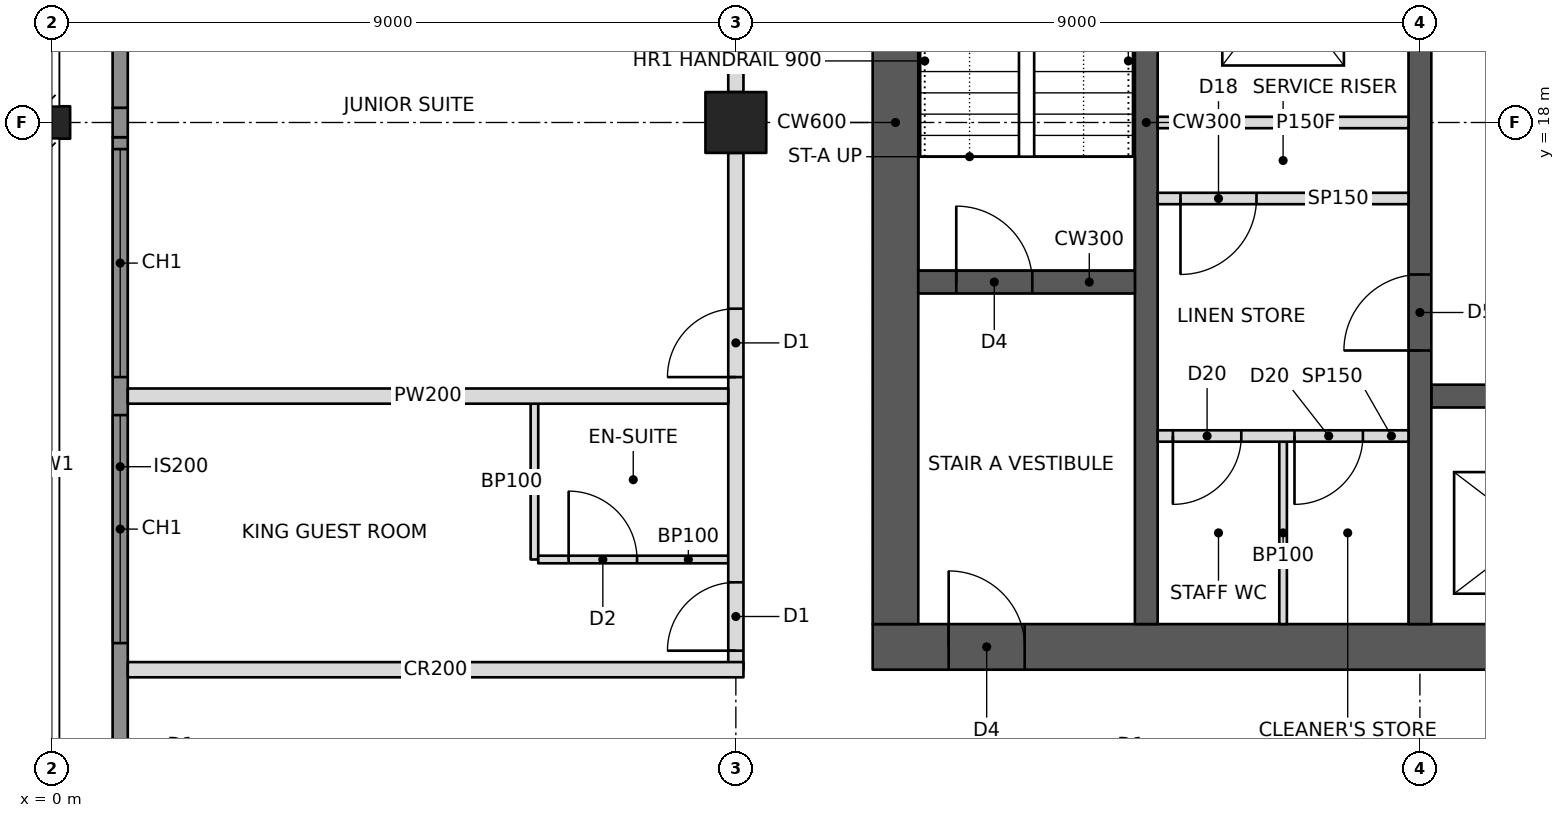
"""IFC4 building model, lengths in metres.
Left out: names, types, materials, properties, quantities, classifications, styles, units other than length and angle.
Written with IfcOpenShell. Run it as: python <this file> out.ifc"""

import sys

from ifc_helpers import new_model, si_unit, direction, frame, frame_2d, origin, origin_2d, place, context, subcontext, project, spatial, rectangle, hollow_rectangle, i_section, extrude, element, fill, save


model = new_model("IFC4")
c1 = context("Model", 3, precision=1e-05, world=origin(), true_north=direction((0.0, 1.0)))
c2 = subcontext(c1, "Body", "Model", "MODEL_VIEW")
j1 = project(units=[si_unit("LENGTHUNIT", "METRE"), si_unit("PLANEANGLEUNIT", "RADIAN")], contexts=[c1])
p1 = place(None, origin())
s1 = spatial("IfcSite", under=j1, at=p1, CompositionType="ELEMENT")
p2 = place(p1, origin())
s2 = spatial("IfcBuilding", under=s1, at=p2, CompositionType="ELEMENT")
p3 = place(p2, frame((0.0, 0.0, 208.0)))
s3 = spatial("IfcBuildingStorey", under=s2, at=p3, CompositionType="ELEMENT", Elevation=208.0)
p4 = place(p3, frame((0.0, 18.0, 0.0), z_axis=(0.0, 0.0, 1.0), x_axis=(0.0, 1.0, 0.0)))
e1 = element("IfcColumn", 1, at=p4, inside=s3, PredefinedType="COLUMN", context=c2, shape_type="SweptSolid", body=[
    extrude(i_section(OverallWidth=0.427, OverallDepth=0.483, WebThickness=0.051, FlangeThickness=0.082, at=origin_2d()), origin(), (0.0, 0.0, 1.0), 3.4),
])
p5 = place(p3, frame((9.0, 18.0, 0.0), z_axis=(0.0, 0.0, 1.0), x_axis=(1.0, 0.0, 0.0)))
e2 = element("IfcColumn", 2, at=p5, inside=s3, PredefinedType="COLUMN", context=c2, shape_type="SweptSolid", body=[
    extrude(hollow_rectangle(XDim=0.8, YDim=0.8, WallThickness=0.05, at=origin_2d()), origin(), (0.0, 0.0, 1.0), 3.4),
])
p6 = place(p3, frame((10.8, 11.1, 0.0), z_axis=(0.0, 0.0, 1.0), x_axis=(1.0, 0.0, 0.0)))
e3 = element("IfcWall", 3, at=p6, inside=s3, PredefinedType="SHEAR", context=c2, shape_type="SweptSolid", body=[
    extrude(rectangle(XDim=23.4, YDim=0.6, at=frame_2d((11.7, 0.0))), origin(), (0.0, 0.0, 1.0), 3.4),
])
p7 = place(p6, frame((1.0, 0.0, 0.0)))
e4 = element("IfcOpeningElement", 4, at=p7, cuts=e3, PredefinedType="OPENING", context=c2, shape_type="SweptSolid", body=[
    extrude(rectangle(XDim=1.0, YDim=2.1, at=frame_2d((0.5, 1.05))), frame((0.0, 0.31, 0.0), z_axis=(0.0, -1.0, 0.0), x_axis=(1.0, 0.0, 0.0)), (0.0, 0.0, 1.0), 0.62),
])
p8 = place(p6, frame((17.2, 0.0, 0.0)))
e5 = element("IfcOpeningElement", 5, at=p8, cuts=e3, PredefinedType="OPENING", context=c2, shape_type="SweptSolid", body=[
    extrude(rectangle(XDim=1.8, YDim=2.1, at=frame_2d((0.9, 1.05))), frame((0.0, 0.31, 0.0), z_axis=(0.0, -1.0, 0.0), x_axis=(1.0, 0.0, 0.0)), (0.0, 0.0, 1.0), 0.62),
])
p9 = place(p3, frame((11.1, 11.4, 0.0), z_axis=(0.0, 0.0, 1.0), x_axis=(0.0, 1.0, 0.0)))
e6 = element("IfcWall", 6, at=p9, inside=s3, PredefinedType="SHEAR", context=c2, shape_type="SweptSolid", body=[
    extrude(rectangle(XDim=13.2, YDim=0.6, at=frame_2d((6.6, 0.0))), origin(), (0.0, 0.0, 1.0), 3.4),
])
p10 = place(p3, frame((14.4, 11.4, 0.0), z_axis=(0.0, 0.0, 1.0), x_axis=(0.0, 1.0, 0.0)))
e7 = element("IfcWall", 7, at=p10, inside=s3, PredefinedType="SHEAR", context=c2, shape_type="SweptSolid", body=[
    extrude(rectangle(XDim=13.2, YDim=0.3, at=frame_2d((6.6, 0.0))), origin(), (0.0, 0.0, 1.0), 3.4),
])
p11 = place(p3, frame((11.4, 15.9, 0.0), z_axis=(0.0, 0.0, 1.0), x_axis=(1.0, 0.0, 0.0)))
e8 = element("IfcWall", 8, at=p11, inside=s3, PredefinedType="SHEAR", context=c2, shape_type="SweptSolid", body=[
    extrude(rectangle(XDim=2.85, YDim=0.3, at=frame_2d((1.425, 0.0))), origin(), (0.0, 0.0, 1.0), 3.4),
])
p12 = place(p11, frame((0.5, 0.0, 0.0)))
e9 = element("IfcOpeningElement", 9, at=p12, cuts=e8, PredefinedType="OPENING", context=c2, shape_type="SweptSolid", body=[
    extrude(rectangle(XDim=1.0, YDim=2.1, at=frame_2d((0.5, 1.05))), frame((0.0, 0.16, 0.0), z_axis=(0.0, -1.0, 0.0), x_axis=(1.0, 0.0, 0.0)), (0.0, 0.0, 1.0), 0.32),
])
p13 = place(p3, frame((18.0, 11.4, 0.0), z_axis=(0.0, 0.0, 1.0), x_axis=(0.0, 1.0, 0.0)))
e10 = element("IfcWall", 10, at=p13, inside=s3, PredefinedType="SHEAR", context=c2, shape_type="SweptSolid", body=[
    extrude(rectangle(XDim=13.2, YDim=0.3, at=frame_2d((6.6, 0.0))), origin(), (0.0, 0.0, 1.0), 3.4),
])
p14 = place(p13, frame((3.6, 0.0, 0.0)))
e11 = element("IfcOpeningElement", 11, at=p14, cuts=e10, PredefinedType="OPENING", context=c2, shape_type="SweptSolid", body=[
    extrude(rectangle(XDim=1.0, YDim=2.1, at=frame_2d((0.5, 1.05))), frame((0.0, 0.16, 0.0), z_axis=(0.0, -1.0, 0.0), x_axis=(1.0, 0.0, 0.0)), (0.0, 0.0, 1.0), 0.32),
])
p15 = place(p13, frame((7.85, 0.0, 0.0)))
e12 = element("IfcOpeningElement", 12, at=p15, cuts=e10, PredefinedType="OPENING", context=c2, shape_type="SweptSolid", body=[
    extrude(rectangle(XDim=1.1, YDim=2.1, at=frame_2d((0.55, 1.05))), frame((0.0, 0.16, 0.0), z_axis=(0.0, -1.0, 0.0), x_axis=(1.0, 0.0, 0.0)), (0.0, 0.0, 1.0), 0.32),
])
p16 = place(p3, frame((14.55, 18.0, 0.0), z_axis=(0.0, 0.0, 1.0), x_axis=(1.0, 0.0, 0.0)))
e13 = element("IfcWall", 13, at=p16, inside=s3, PredefinedType="PARTITIONING", context=c2, shape_type="SweptSolid", body=[
    extrude(rectangle(XDim=3.3, YDim=0.15, at=frame_2d((1.65, 0.0))), origin(), (0.0, 0.0, 1.0), 3.2),
])
p17 = place(p3, frame((18.15, 14.4, 0.0), z_axis=(0.0, 0.0, 1.0), x_axis=(1.0, 0.0, 0.0)))
e14 = element("IfcWall", 14, at=p17, inside=s3, PredefinedType="SHEAR", context=c2, shape_type="SweptSolid", body=[
    extrude(rectangle(XDim=9.0, YDim=0.3, at=frame_2d((4.5, 0.0))), origin(), (0.0, 0.0, 1.0), 3.4),
])
p18 = place(p17, frame((0.8, 0.0, 0.0)))
e15 = element("IfcOpeningElement", 15, at=p18, cuts=e14, PredefinedType="OPENING", context=c2, shape_type="SweptSolid", body=[
    extrude(rectangle(XDim=1.1, YDim=2.1, at=frame_2d((0.55, 1.05))), frame((0.0, 0.16, 0.0), z_axis=(0.0, -1.0, 0.0), x_axis=(1.0, 0.0, 0.0)), (0.0, 0.0, 1.0), 0.32),
])
p19 = place(p17, frame((6.75, 0.0, 0.0)))
e16 = element("IfcOpeningElement", 16, at=p19, cuts=e14, PredefinedType="OPENING", context=c2, shape_type="SweptSolid", body=[
    extrude(rectangle(XDim=1.2, YDim=2.1, at=frame_2d((0.6, 1.05))), frame((0.0, 0.16, 0.0), z_axis=(0.0, -1.0, 0.0), x_axis=(1.0, 0.0, 0.0)), (0.0, 0.0, 1.0), 0.32),
])
p20 = place(p17, frame((3.8, 0.0, 0.0)))
e17 = element("IfcOpeningElement", 17, at=p20, cuts=e14, PredefinedType="OPENING", context=c2, shape_type="SweptSolid", body=[
    extrude(rectangle(XDim=1.1, YDim=2.1, at=frame_2d((0.55, 1.05))), frame((0.0, 0.16, 0.0), z_axis=(0.0, -1.0, 0.0), x_axis=(1.0, 0.0, 0.0)), (0.0, 0.0, 1.0), 0.32),
])
p21 = place(p3, frame((9.0, 10.8, 0.0), z_axis=(0.0, 0.0, 1.0), x_axis=(0.0, 1.0, 0.0)))
e18 = element("IfcWall", 18, at=p21, inside=s3, PredefinedType="PARTITIONING", context=c2, shape_type="SweptSolid", body=[
    extrude(rectangle(XDim=6.8, YDim=0.2, at=frame_2d((3.4, 0.0))), origin(), (0.0, 0.0, 1.0), 2.405),
])
p22 = place(p21, frame((0.25, 0.0, 0.0)))
e19 = element("IfcOpeningElement", 19, at=p22, cuts=e18, PredefinedType="OPENING", context=c2, shape_type="SweptSolid", body=[
    extrude(rectangle(XDim=0.9, YDim=2.1, at=frame_2d((0.45, 1.05))), frame((0.0, 0.11, 0.0), z_axis=(0.0, -1.0, 0.0), x_axis=(1.0, 0.0, 0.0)), (0.0, 0.0, 1.0), 0.22),
])
p23 = place(p21, frame((3.85, 0.0, 0.0)))
e20 = element("IfcOpeningElement", 20, at=p23, cuts=e18, PredefinedType="OPENING", context=c2, shape_type="SweptSolid", body=[
    extrude(rectangle(XDim=0.9, YDim=2.1, at=frame_2d((0.45, 1.05))), frame((0.0, 0.11, 0.0), z_axis=(0.0, -1.0, 0.0), x_axis=(1.0, 0.0, 0.0)), (0.0, 0.0, 1.0), 0.22),
])
p24 = place(p3, frame((9.0, 18.4, 0.0), z_axis=(0.0, 0.0, 1.0), x_axis=(0.0, 1.0, 0.0)))
e21 = element("IfcWall", 21, at=p24, inside=s3, PredefinedType="PARTITIONING", context=c2, shape_type="SweptSolid", body=[
    extrude(rectangle(XDim=8.2, YDim=0.2, at=frame_2d((4.1, 0.0))), origin(), (0.0, 0.0, 1.0), 2.405),
])
p25 = place(p3, frame((1.0, 10.8, 0.0), z_axis=(0.0, 0.0, 1.0), x_axis=(1.0, 0.0, 0.0)))
e22 = element("IfcWall", 22, at=p25, inside=s3, PredefinedType="PARTITIONING", context=c2, shape_type="SweptSolid", body=[
    extrude(rectangle(XDim=8.1, YDim=0.2, at=frame_2d((4.05, 0.0))), origin(), (0.0, 0.0, 1.0), 2.404),
])
p26 = place(p3, frame((8.9, 14.4, 0.0), z_axis=(0.0, 0.0, 1.0), x_axis=(-1.0, 0.0, 0.0)))
e23 = element("IfcWall", 23, at=p26, inside=s3, PredefinedType="PARTITIONING", context=c2, shape_type="SweptSolid", body=[
    extrude(rectangle(XDim=7.9, YDim=0.2, at=frame_2d((3.95, 0.0))), origin(), (0.0, 0.0, 1.0), 2.404),
])
p27 = place(p3, frame((6.35, 12.25, 0.0), z_axis=(0.0, 0.0, 1.0), x_axis=(0.0, 1.0, 0.0)))
e24 = element("IfcWall", 24, at=p27, inside=s3, PredefinedType="PARTITIONING", context=c2, shape_type="SweptSolid", body=[
    extrude(rectangle(XDim=2.05, YDim=0.1, at=frame_2d((1.025, 0.0))), origin(), (0.0, 0.0, 1.0), 3.2),
])
p28 = place(p3, frame((8.9, 12.25, 0.0), z_axis=(0.0, 0.0, 1.0), x_axis=(-1.0, 0.0, 0.0)))
e25 = element("IfcWall", 25, at=p28, inside=s3, PredefinedType="PARTITIONING", context=c2, shape_type="SweptSolid", body=[
    extrude(rectangle(XDim=2.5, YDim=0.1, at=frame_2d((1.25, 0.0))), origin(), (0.0, 0.0, 1.0), 2.404),
])
p29 = place(p28, frame((1.2, 0.0, 0.0)))
e26 = element("IfcOpeningElement", 26, at=p29, cuts=e25, PredefinedType="OPENING", context=c2, shape_type="SweptSolid", body=[
    extrude(rectangle(XDim=0.9, YDim=2.1, at=frame_2d((0.45, 1.05))), frame((0.0, 0.06, 0.0), z_axis=(0.0, -1.0, 0.0), x_axis=(1.0, 0.0, 0.0)), (0.0, 0.0, 1.0), 0.12),
])
p30 = place(p3, frame((14.55, 17.0, 0.0), z_axis=(0.0, 0.0, 1.0), x_axis=(1.0, 0.0, 0.0)))
e27 = element("IfcWall", 27, at=p30, inside=s3, PredefinedType="PARTITIONING", context=c2, shape_type="SweptSolid", body=[
    extrude(rectangle(XDim=3.3, YDim=0.15, at=frame_2d((1.65, 0.0))), origin(), (0.0, 0.0, 1.0), 3.2),
])
p31 = place(p30, frame((0.3, 0.0, 0.0)))
e28 = element("IfcOpeningElement", 28, at=p31, cuts=e27, PredefinedType="OPENING", context=c2, shape_type="SweptSolid", body=[
    extrude(rectangle(XDim=1.0, YDim=2.1, at=frame_2d((0.5, 1.05))), frame((0.0, 0.085, 0.0), z_axis=(0.0, -1.0, 0.0), x_axis=(1.0, 0.0, 0.0)), (0.0, 0.0, 1.0), 0.17),
])
p32 = place(p3, frame((14.55, 13.875, 0.0), z_axis=(0.0, 0.0, 1.0), x_axis=(1.0, 0.0, 0.0)))
e29 = element("IfcWall", 29, at=p32, inside=s3, PredefinedType="PARTITIONING", context=c2, shape_type="SweptSolid", body=[
    extrude(rectangle(XDim=3.3, YDim=0.15, at=frame_2d((1.65, 0.0))), origin(), (0.0, 0.0, 1.0), 3.2),
])
p33 = place(p32, frame((0.2, 0.0, 0.0)))
e30 = element("IfcOpeningElement", 30, at=p33, cuts=e29, PredefinedType="OPENING", context=c2, shape_type="SweptSolid", body=[
    extrude(rectangle(XDim=0.9, YDim=2.1, at=frame_2d((0.45, 1.05))), frame((0.0, 0.085, 0.0), z_axis=(0.0, -1.0, 0.0), x_axis=(1.0, 0.0, 0.0)), (0.0, 0.0, 1.0), 0.17),
])
p34 = place(p32, frame((1.8, 0.0, 0.0)))
e31 = element("IfcOpeningElement", 31, at=p34, cuts=e29, PredefinedType="OPENING", context=c2, shape_type="SweptSolid", body=[
    extrude(rectangle(XDim=0.9, YDim=2.1, at=frame_2d((0.45, 1.05))), frame((0.0, 0.085, 0.0), z_axis=(0.0, -1.0, 0.0), x_axis=(1.0, 0.0, 0.0)), (0.0, 0.0, 1.0), 0.17),
])
p35 = place(p3, frame((16.2, 11.4, 0.0), z_axis=(0.0, 0.0, 1.0), x_axis=(0.0, 1.0, 0.0)))
e32 = element("IfcWall", 32, at=p35, inside=s3, PredefinedType="PARTITIONING", context=c2, shape_type="SweptSolid", body=[
    extrude(rectangle(XDim=2.4, YDim=0.1, at=frame_2d((1.2, 0.0))), origin(), (0.0, 0.0, 1.0), 3.2),
])
p36 = place(p3, frame((0.9, 9.135, 0.0), z_axis=(0.0, 0.0, 1.0), x_axis=(0.0, 1.0, 0.0)))
e33 = element("IfcWall", 33, at=p36, inside=s3, PredefinedType="SOLIDWALL", context=c2, shape_type="SweptSolid", body=[
    extrude(rectangle(XDim=8.671, YDim=0.2, at=frame_2d((4.335, 0.0))), origin(), (0.0, 0.0, 1.0), 3.2),
])
p37 = place(p36, frame((2.015, 0.0, 0.6)))
e34 = element("IfcOpeningElement", 34, at=p37, cuts=e33, PredefinedType="OPENING", context=c2, shape_type="SweptSolid", body=[
    extrude(rectangle(XDim=3.0, YDim=2.2, at=frame_2d((1.5, 1.1))), frame((0.0, 0.11, 0.0), z_axis=(0.0, -1.0, 0.0), x_axis=(1.0, 0.0, 0.0)), (0.0, 0.0, 1.0), 0.22),
])
p38 = place(p36, frame((5.515, 0.0, 0.6)))
e35 = element("IfcOpeningElement", 35, at=p38, cuts=e33, PredefinedType="OPENING", context=c2, shape_type="SweptSolid", body=[
    extrude(rectangle(XDim=3.0, YDim=2.2, at=frame_2d((1.5, 1.1))), frame((0.0, 0.11, 0.0), z_axis=(0.0, -1.0, 0.0), x_axis=(1.0, 0.0, 0.0)), (0.0, 0.0, 1.0), 0.22),
])
p39 = place(p3, frame((0.9, 17.806, 0.0), z_axis=(0.0, 0.0, 1.0), x_axis=(0.0, 1.0, 0.0)))
e36 = element("IfcWall", 36, at=p39, inside=s3, PredefinedType="SOLIDWALL", context=c2, shape_type="SweptSolid", body=[
    extrude(rectangle(XDim=0.388, YDim=0.2, at=frame_2d((0.194, 0.0))), origin(), (0.0, 0.0, 1.0), 2.404),
])
p40 = place(p3, frame((0.9, 18.194, 0.0), z_axis=(0.0, 0.0, 1.0), x_axis=(0.0, 1.0, 0.0)))
e37 = element("IfcWall", 37, at=p40, inside=s3, PredefinedType="SOLIDWALL", context=c2, shape_type="SweptSolid", body=[
    extrude(rectangle(XDim=5.806, YDim=0.2, at=frame_2d((2.903, 0.0))), origin(), (0.0, 0.0, 1.0), 3.2),
])
p41 = place(p40, frame((1.356, 0.0, 0.6)))
e38 = element("IfcOpeningElement", 38, at=p41, cuts=e37, PredefinedType="OPENING", context=c2, shape_type="SweptSolid", body=[
    extrude(rectangle(XDim=3.0, YDim=2.2, at=frame_2d((1.5, 1.1))), frame((0.0, 0.11, 0.0), z_axis=(0.0, -1.0, 0.0), x_axis=(1.0, 0.0, 0.0)), (0.0, 0.0, 1.0), 0.22),
])
p42 = place(p37, origin())
e39 = element("IfcWindow", 39, at=p42, inside=s3, PartitioningType="TRIPLE_PANEL_VERTICAL", PredefinedType="WINDOW", context=c2, shape_type="SweptSolid", body=[
    extrude(rectangle(XDim=3.0, YDim=2.2, at=frame_2d((1.5, 1.1))), frame((0.0, 0.03, 0.0), z_axis=(0.0, -1.0, 0.0), x_axis=(1.0, 0.0, 0.0)), (0.0, 0.0, 1.0), 0.06),
])
fill(e34, e39)
p43 = place(p38, origin())
e40 = element("IfcWindow", 40, at=p43, inside=s3, PartitioningType="TRIPLE_PANEL_VERTICAL", PredefinedType="WINDOW", context=c2, shape_type="SweptSolid", body=[
    extrude(rectangle(XDim=3.0, YDim=2.2, at=frame_2d((1.5, 1.1))), frame((0.0, 0.03, 0.0), z_axis=(0.0, -1.0, 0.0), x_axis=(1.0, 0.0, 0.0)), (0.0, 0.0, 1.0), 0.06),
])
fill(e35, e40)
p44 = place(p29, frame((0.9, 0.0, 0.0), z_axis=(0.0, 0.0, 1.0), x_axis=(-1.0, 0.0, 0.0)))
e41 = element("IfcDoor", 41, at=p44, inside=s3, OperationType="SINGLE_SWING_LEFT", PredefinedType="DOOR", context=c2, shape_type="SweptSolid", body=[
    extrude(rectangle(XDim=0.9, YDim=2.1, at=frame_2d((0.45, 1.05))), frame((0.0, 0.025, 0.0), z_axis=(0.0, -1.0, 0.0), x_axis=(1.0, 0.0, 0.0)), (0.0, 0.0, 1.0), 0.05),
])
fill(e26, e41)
p45 = place(p22, origin())
e42 = element("IfcDoor", 42, at=p45, inside=s3, OperationType="SINGLE_SWING_LEFT", PredefinedType="DOOR", context=c2, shape_type="SweptSolid", body=[
    extrude(rectangle(XDim=0.9, YDim=2.1, at=frame_2d((0.45, 1.05))), frame((0.0, 0.025, 0.0), z_axis=(0.0, -1.0, 0.0), x_axis=(1.0, 0.0, 0.0)), (0.0, 0.0, 1.0), 0.05),
])
fill(e19, e42)
p46 = place(p23, origin())
e43 = element("IfcDoor", 43, at=p46, inside=s3, OperationType="SINGLE_SWING_LEFT", PredefinedType="DOOR", context=c2, shape_type="SweptSolid", body=[
    extrude(rectangle(XDim=0.9, YDim=2.1, at=frame_2d((0.45, 1.05))), frame((0.0, 0.025, 0.0), z_axis=(0.0, -1.0, 0.0), x_axis=(1.0, 0.0, 0.0)), (0.0, 0.0, 1.0), 0.05),
])
fill(e20, e43)
p47 = place(p31, frame((1.0, 0.0, 0.0), z_axis=(0.0, 0.0, 1.0), x_axis=(-1.0, 0.0, 0.0)))
e44 = element("IfcDoor", 44, at=p47, inside=s3, OperationType="SINGLE_SWING_RIGHT", PredefinedType="DOOR", context=c2, shape_type="SweptSolid", body=[
    extrude(rectangle(XDim=1.0, YDim=2.1, at=frame_2d((0.5, 1.05))), frame((0.0, 0.025, 0.0), z_axis=(0.0, -1.0, 0.0), x_axis=(1.0, 0.0, 0.0)), (0.0, 0.0, 1.0), 0.05),
])
fill(e28, e44)
p48 = place(p33, frame((0.9, 0.0, 0.0), z_axis=(0.0, 0.0, 1.0), x_axis=(-1.0, 0.0, 0.0)))
e45 = element("IfcDoor", 45, at=p48, inside=s3, OperationType="SINGLE_SWING_RIGHT", PredefinedType="DOOR", context=c2, shape_type="SweptSolid", body=[
    extrude(rectangle(XDim=0.9, YDim=2.1, at=frame_2d((0.45, 1.05))), frame((0.0, 0.025, 0.0), z_axis=(0.0, -1.0, 0.0), x_axis=(1.0, 0.0, 0.0)), (0.0, 0.0, 1.0), 0.05),
])
fill(e30, e45)
p49 = place(p34, frame((0.9, 0.0, 0.0), z_axis=(0.0, 0.0, 1.0), x_axis=(-1.0, 0.0, 0.0)))
e46 = element("IfcDoor", 46, at=p49, inside=s3, OperationType="SINGLE_SWING_RIGHT", PredefinedType="DOOR", context=c2, shape_type="SweptSolid", body=[
    extrude(rectangle(XDim=0.9, YDim=2.1, at=frame_2d((0.45, 1.05))), frame((0.0, 0.025, 0.0), z_axis=(0.0, -1.0, 0.0), x_axis=(1.0, 0.0, 0.0)), (0.0, 0.0, 1.0), 0.05),
])
fill(e31, e46)
p50 = place(p7, origin())
e47 = element("IfcDoor", 47, at=p50, inside=s3, OperationType="SINGLE_SWING_LEFT", PredefinedType="DOOR", context=c2, shape_type="SweptSolid", body=[
    extrude(rectangle(XDim=1.0, YDim=2.1, at=frame_2d((0.5, 1.05))), frame((0.0, 0.025, 0.0), z_axis=(0.0, -1.0, 0.0), x_axis=(1.0, 0.0, 0.0)), (0.0, 0.0, 1.0), 0.05),
])
fill(e4, e47)
p51 = place(p12, origin())
e48 = element("IfcDoor", 48, at=p51, inside=s3, OperationType="SINGLE_SWING_LEFT", PredefinedType="DOOR", context=c2, shape_type="SweptSolid", body=[
    extrude(rectangle(XDim=1.0, YDim=2.1, at=frame_2d((0.5, 1.05))), frame((0.0, 0.025, 0.0), z_axis=(0.0, -1.0, 0.0), x_axis=(1.0, 0.0, 0.0)), (0.0, 0.0, 1.0), 0.05),
])
fill(e9, e48)
p52 = place(p14, origin())
e49 = element("IfcDoor", 49, at=p52, inside=s3, OperationType="SINGLE_SWING_LEFT", PredefinedType="DOOR", context=c2, shape_type="SweptSolid", body=[
    extrude(rectangle(XDim=1.0, YDim=2.1, at=frame_2d((0.5, 1.05))), frame((0.0, 0.025, 0.0), z_axis=(0.0, -1.0, 0.0), x_axis=(1.0, 0.0, 0.0)), (0.0, 0.0, 1.0), 0.05),
])
fill(e11, e49)
save(model, sys.argv[1])
